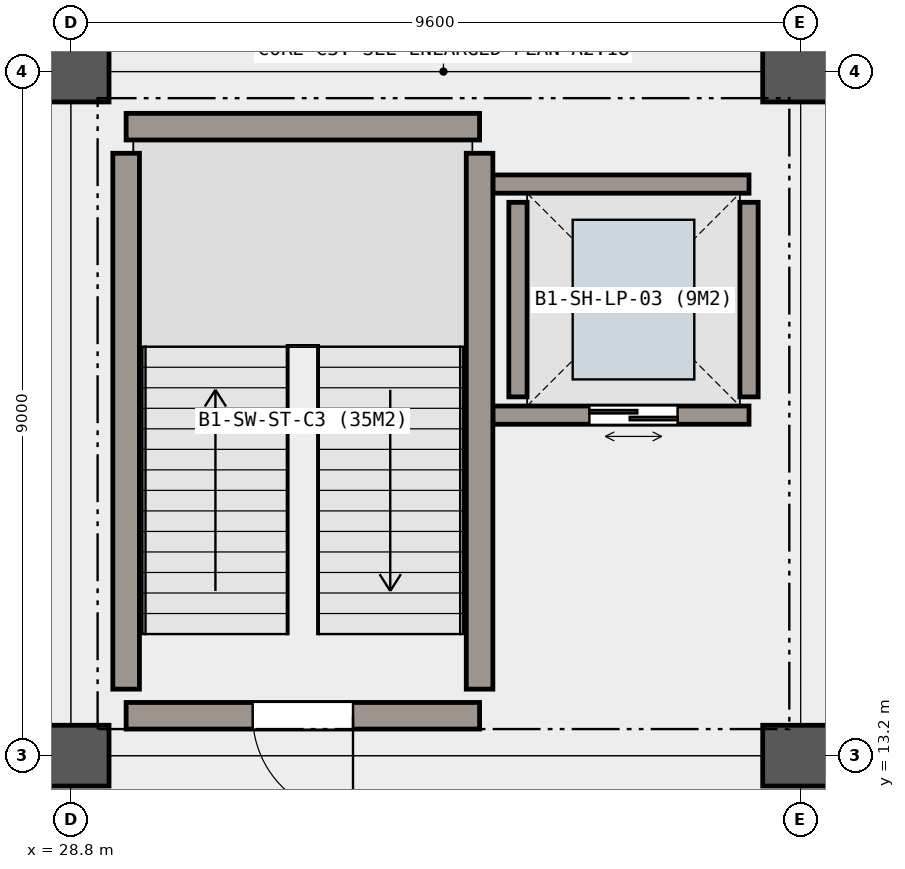
"""IFC4 building model, lengths in metres.
Left out: names, types, materials, properties, quantities, classifications, styles, units other than length and angle.
Written with IfcOpenShell. Run it as: python <this file> out.ifc"""

import sys

from ifc_helpers import new_model, si_unit, direction, frame, frame_2d, origin, origin_2d, place, context, subcontext, project, spatial, rectangle, extrude, element, fill, save


model = new_model("IFC4")
c1 = context("Model", 3, precision=1e-05, world=origin(), true_north=direction((0.0, 1.0)))
c2 = subcontext(c1, "Body", "Model", "MODEL_VIEW")
j1 = project(units=[si_unit("LENGTHUNIT", "METRE"), si_unit("PLANEANGLEUNIT", "RADIAN")], contexts=[c1])
p1 = place(None, origin())
s1 = spatial("IfcSite", under=j1, at=p1, CompositionType="ELEMENT")
p2 = place(p1, origin())
s2 = spatial("IfcBuilding", under=s1, at=p2, CompositionType="ELEMENT")
p3 = place(p2, frame((0.0, 0.0, -4.8)))
s3 = spatial("IfcBuildingStorey", under=s2, at=p3, CompositionType="ELEMENT", Elevation=-4.8)
for number, where, z_axis, x_axis in (
    (1, (28.8, 13.2, 0.0), (0.0, 0.0, 1.0), (1.0, 0.0, 0.0)),
    (2, (28.8, 22.2, 0.0), (0.0, 0.0, 1.0), (1.0, 0.0, 0.0)),
    (3, (38.4, 13.2, 0.0), (0.0, 0.0, 1.0), (1.0, 0.0, 0.0)),
    (4, (38.4, 22.2, 0.0), (0.0, 0.0, 1.0), (1.0, 0.0, 0.0)),
):
    element("IfcColumn", number, at=place(p3, frame(where, z_axis=z_axis, x_axis=x_axis)), inside=s3, PredefinedType="COLUMN", context=c2, shape_type="SweptSolid", body=[
        extrude(rectangle(XDim=1.0, YDim=0.8, at=origin_2d()), origin(), (0.0, 0.0, 1.0), 4.8),
    ])
p4 = place(p3, frame((37.72, 17.68, 0.0), z_axis=(0.0, 0.0, 1.0), x_axis=(-1.0, 0.0, 0.0)))
e5 = element("IfcWall", 5, at=p4, inside=s3, PredefinedType="SHEAR", context=c2, shape_type="SweptSolid", body=[
    extrude(rectangle(XDim=3.37, YDim=0.24, at=frame_2d((1.685, 0.0))), origin(), (0.0, 0.0, 1.0), 4.48),
])
p5 = place(p4, frame((0.94, 0.0, 0.0)))
e6 = element("IfcOpeningElement", 6, at=p5, cuts=e5, PredefinedType="OPENING", context=c2, shape_type="SweptSolid", body=[
    extrude(rectangle(XDim=1.16, YDim=2.15, at=frame_2d((0.58, 1.075))), frame((0.0, 0.13, 0.0), z_axis=(0.0, -1.0, 0.0), x_axis=(1.0, 0.0, 0.0)), (0.0, 0.0, 1.0), 0.26),
])
p6 = place(p3, frame((34.35, 20.72, 0.0), z_axis=(0.0, 0.0, 1.0), x_axis=(1.0, 0.0, 0.0)))
e7 = element("IfcWall", 7, at=p6, inside=s3, PredefinedType="SHEAR", context=c2, shape_type="SweptSolid", body=[
    extrude(rectangle(XDim=3.37, YDim=0.24, at=frame_2d((1.685, 0.0))), origin(), (0.0, 0.0, 1.0), 4.48),
])
for number, where, z_axis, x_axis in (
    (8, (34.68, 17.92, 0.0), (0.0, 0.0, 1.0), (0.0, 1.0, 0.0)),
    (9, (37.72, 20.48, 0.0), (0.0, 0.0, 1.0), (0.0, -1.0, 0.0)),
):
    element("IfcWall", number, at=place(p3, frame(where, z_axis=z_axis, x_axis=x_axis)), inside=s3, PredefinedType="SHEAR", context=c2, shape_type="SweptSolid", body=[
        extrude(rectangle(XDim=2.56, YDim=0.24, at=frame_2d((1.28, 0.0))), origin(), (0.0, 0.0, 1.0), 4.48),
    ])
p7 = place(p3, frame((34.175, 13.725, 0.0), z_axis=(0.0, 0.0, 1.0), x_axis=(-1.0, 0.0, 0.0)))
e10 = element("IfcWall", 10, at=p7, inside=s3, PredefinedType="SHEAR", context=c2, shape_type="SweptSolid", body=[
    extrude(rectangle(XDim=4.65, YDim=0.35, at=frame_2d((2.325, 0.0))), origin(), (0.0, 0.0, 1.0), 4.48),
])
p8 = place(p7, frame((1.665, 0.0, 0.0)))
e11 = element("IfcOpeningElement", 11, at=p8, cuts=e10, PredefinedType="OPENING", context=c2, shape_type="SweptSolid", body=[
    extrude(rectangle(XDim=1.32, YDim=2.15, at=frame_2d((0.66, 1.075))), frame((0.0, 0.185, 0.0), z_axis=(0.0, -1.0, 0.0), x_axis=(1.0, 0.0, 0.0)), (0.0, 0.0, 1.0), 0.37),
])
p9 = place(p3, frame((29.525, 21.475, 0.0), z_axis=(0.0, 0.0, 1.0), x_axis=(1.0, 0.0, 0.0)))
e12 = element("IfcWall", 12, at=p9, inside=s3, PredefinedType="SHEAR", context=c2, shape_type="SweptSolid", body=[
    extrude(rectangle(XDim=4.65, YDim=0.35, at=frame_2d((2.325, 0.0))), origin(), (0.0, 0.0, 1.0), 4.48),
])
for number, where, z_axis, x_axis in (
    (13, (29.525, 14.075, 0.0), (0.0, 0.0, 1.0), (0.0, 1.0, 0.0)),
    (14, (34.175, 21.125, 0.0), (0.0, 0.0, 1.0), (0.0, -1.0, 0.0)),
):
    element("IfcWall", number, at=place(p3, frame(where, z_axis=z_axis, x_axis=x_axis)), inside=s3, PredefinedType="SHEAR", context=c2, shape_type="SweptSolid", body=[
        extrude(rectangle(XDim=7.05, YDim=0.35, at=frame_2d((3.525, 0.0))), origin(), (0.0, 0.0, 1.0), 4.48),
    ])
p10 = place(p5, origin())
e15 = element("IfcDoor", 15, at=p10, inside=s3, OperationType="DOUBLE_DOOR_SLIDING", PredefinedType="DOOR", context=c2, shape_type="SweptSolid", body=[
    extrude(rectangle(XDim=1.16, YDim=2.15, at=frame_2d((0.58, 1.075))), frame((0.0, 0.025, 0.0), z_axis=(0.0, -1.0, 0.0), x_axis=(1.0, 0.0, 0.0)), (0.0, 0.0, 1.0), 0.05),
])
fill(e6, e15)
p11 = place(p8, origin())
e16 = element("IfcDoor", 16, at=p11, inside=s3, OperationType="SINGLE_SWING_LEFT", PredefinedType="DOOR", context=c2, shape_type="SweptSolid", body=[
    extrude(rectangle(XDim=1.32, YDim=2.15, at=frame_2d((0.66, 1.075))), frame((0.0, 0.025, 0.0), z_axis=(0.0, -1.0, 0.0), x_axis=(1.0, 0.0, 0.0)), (0.0, 0.0, 1.0), 0.05),
])
fill(e11, e16)
save(model, sys.argv[1])
